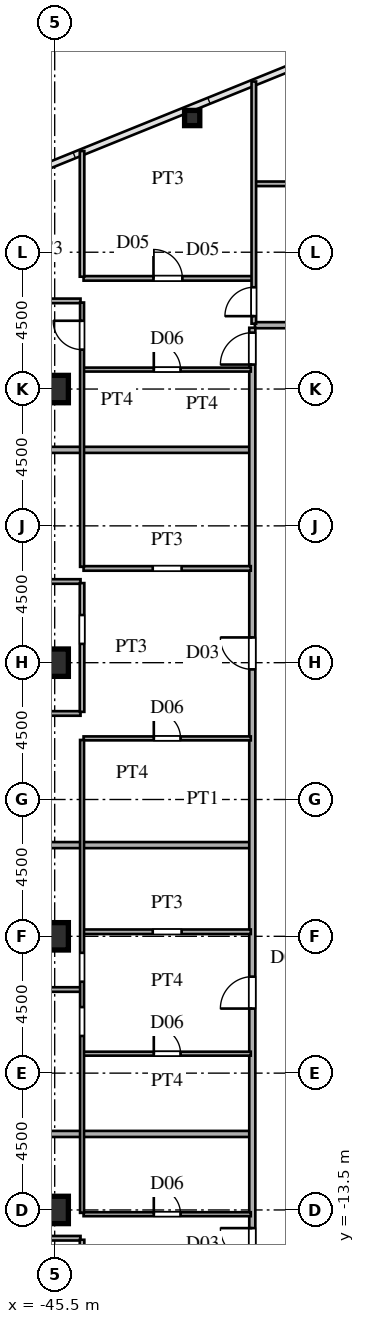
"""IFC4 building model, lengths in metres.
Left out: names, types, materials, properties, quantities, classifications, styles, units other than length and angle.
Written with IfcOpenShell. Run it as: python <this file> out.ifc"""

import sys

from ifc_helpers import new_model, si_unit, direction, frame, frame_2d, origin, origin_2d, place, context, subcontext, project, spatial, rectangle, hollow_rectangle, i_section, extrude, source, transform, mapped, element, fill, save


model = new_model("IFC4")
c1 = context("Model", 3, precision=1e-05, world=origin(), true_north=direction((0.0, 1.0)))
c2 = subcontext(c1, "Body", "Model", "MODEL_VIEW")
j1 = project(units=[si_unit("LENGTHUNIT", "METRE"), si_unit("PLANEANGLEUNIT", "RADIAN")], contexts=[c1])
p1 = place(None, origin())
s1 = spatial("IfcSite", under=j1, at=p1, CompositionType="ELEMENT")
p2 = place(p1, origin())
s2 = spatial("IfcBuilding", under=s1, at=p2, CompositionType="ELEMENT")
p3 = place(p2, frame((0.0, 0.0, 36.9)))
s3 = spatial("IfcBuildingStorey", under=s2, at=p3, CompositionType="ELEMENT", Elevation=36.9)
m1 = source(origin(), c2, "Body", "SweptSolid", [
    extrude(i_section(OverallWidth=0.9, OverallDepth=0.9, WebThickness=0.036, FlangeThickness=0.055, at=origin_2d()), origin(), (0.0, 0.0, 1.0), 3.6),
])
for number, where, z_axis, x_axis in (
    (1, (-45.5, -13.5, 0.0), (0.0, 0.0, 1.0), (1.0, 0.0, 0.0)),
    (2, (-45.5, -4.5, 0.0), (0.0, 0.0, 1.0), (1.0, 0.0, 0.0)),
    (3, (-45.5, 4.5, 0.0), (0.0, 0.0, 1.0), (1.0, 0.0, 0.0)),
    (4, (-45.5, 13.5, 0.0), (0.0, 0.0, 1.0), (1.0, 0.0, 0.0)),
):
    element("IfcColumn", number, at=place(p3, frame(where, z_axis=z_axis, x_axis=x_axis)), inside=s3, PredefinedType="COLUMN", context=c2, shape_type="MappedRepresentation", body=[
        mapped(m1, transform((0.0, 0.0, 0.0), scale=1.0)),
    ])
m2 = source(origin(), c2, "Body", "SweptSolid", [
    extrude(hollow_rectangle(XDim=0.5, YDim=0.5, WallThickness=0.02, at=origin_2d()), origin(), (0.0, 0.0, 1.0), 3.6),
])
p4 = place(p3, frame((-40.977, 22.414, 0.0), z_axis=(0.0, 0.0, 1.0), x_axis=(1.0, 0.0, 0.0)))
e5 = element("IfcColumn", 5, at=p4, inside=s3, PredefinedType="COLUMN", context=c2, shape_type="MappedRepresentation", body=[
    mapped(m2, transform((0.0, 0.0, 0.0), scale=1.0)),
])
p5 = place(p3, frame((-61.588, -14.43, 0.0), z_axis=(0.0, 0.0, 1.0), x_axis=(1.0, 0.0, 0.0)))
e6 = element("IfcWall", 6, at=p5, inside=s3, PredefinedType="PARTITIONING", context=c2, shape_type="SweptSolid", body=[
    extrude(rectangle(XDim=16.938, YDim=0.15, at=frame_2d((8.469, 0.0))), origin(), (0.0, 0.0, 1.0), 3.38),
])
p6 = place(p5, frame((11.563, 0.0, 0.0)))
e7 = element("IfcOpeningElement", 7, at=p6, cuts=e6, PredefinedType="OPENING", context=c2, shape_type="SweptSolid", body=[
    extrude(rectangle(XDim=0.95, YDim=2.15, at=frame_2d((0.475, 1.075))), frame((0.0, 0.085, 0.0), z_axis=(0.0, -1.0, 0.0), x_axis=(1.0, 0.0, 0.0)), (0.0, 0.0, 1.0), 0.17),
])
p7 = place(p3, frame((-44.55, -13.64, 0.0), z_axis=(0.0, 0.0, 1.0), x_axis=(1.0, 0.0, 0.0)))
e8 = element("IfcWall", 8, at=p7, inside=s3, PredefinedType="PARTITIONING", context=c2, shape_type="SweptSolid", body=[
    extrude(rectangle(XDim=5.5, YDim=0.13, at=frame_2d((2.75, 0.0))), origin(), (0.0, 0.0, 1.0), 2.68),
])
p8 = place(p7, frame((2.31, 0.0, 0.0)))
e9 = element("IfcOpeningElement", 9, at=p8, cuts=e8, PredefinedType="OPENING", context=c2, shape_type="SweptSolid", body=[
    extrude(rectangle(XDim=0.88, YDim=2.1, at=frame_2d((0.44, 1.05))), frame((0.0, 0.075, 0.0), z_axis=(0.0, -1.0, 0.0), x_axis=(1.0, 0.0, 0.0)), (0.0, 0.0, 1.0), 0.15),
])
p9 = place(p3, frame((-70.043, -11.0, 0.0), z_axis=(0.0, 0.0, 1.0), x_axis=(1.0, 0.0, 0.0)))
e10 = element("IfcWall", 10, at=p9, inside=s3, PredefinedType="PARTITIONING", context=c2, shape_type="SweptSolid", body=[
    extrude(rectangle(XDim=30.963, YDim=0.2, at=frame_2d((15.481, 0.0))), origin(), (0.0, 0.0, 1.0), 3.38),
])
p10 = place(p3, frame((-44.55, -8.36, 0.0), z_axis=(0.0, 0.0, 1.0), x_axis=(1.0, 0.0, 0.0)))
e11 = element("IfcWall", 11, at=p10, inside=s3, PredefinedType="PARTITIONING", context=c2, shape_type="SweptSolid", body=[
    extrude(rectangle(XDim=5.5, YDim=0.13, at=frame_2d((2.75, 0.0))), origin(), (0.0, 0.0, 1.0), 3.38),
])
p11 = place(p10, frame((2.31, 0.0, 0.0)))
e12 = element("IfcOpeningElement", 12, at=p11, cuts=e11, PredefinedType="OPENING", context=c2, shape_type="SweptSolid", body=[
    extrude(rectangle(XDim=0.88, YDim=2.1, at=frame_2d((0.44, 1.05))), frame((0.0, 0.075, 0.0), z_axis=(0.0, -1.0, 0.0), x_axis=(1.0, 0.0, 0.0)), (0.0, 0.0, 1.0), 0.15),
])
p12 = place(p3, frame((-72.535, -6.25, 0.0), z_axis=(0.0, 0.0, 1.0), x_axis=(1.0, 0.0, 0.0)))
e13 = element("IfcWall", 13, at=p12, inside=s3, PredefinedType="PARTITIONING", context=c2, shape_type="SweptSolid", body=[
    extrude(rectangle(XDim=27.885, YDim=0.15, at=frame_2d((13.942, 0.0))), origin(), (0.0, 0.0, 1.0), 3.38),
])
p13 = place(p12, frame((14.71, 0.0, 0.0)))
e14 = element("IfcOpeningElement", 14, at=p13, cuts=e13, PredefinedType="OPENING", context=c2, shape_type="SweptSolid", body=[
    extrude(rectangle(XDim=0.95, YDim=2.15, at=frame_2d((0.475, 1.075))), frame((0.0, 0.085, 0.0), z_axis=(0.0, -1.0, 0.0), x_axis=(1.0, 0.0, 0.0)), (0.0, 0.0, 1.0), 0.17),
])
p14 = place(p3, frame((-44.55, -4.35, 0.0), z_axis=(0.0, 0.0, 1.0), x_axis=(1.0, 0.0, 0.0)))
e15 = element("IfcWall", 15, at=p14, inside=s3, PredefinedType="PARTITIONING", context=c2, shape_type="SweptSolid", body=[
    extrude(rectangle(XDim=5.5, YDim=0.15, at=frame_2d((2.75, 0.0))), origin(), (0.0, 0.0, 1.0), 2.68),
])
p15 = place(p14, frame((2.275, 0.0, 0.0)))
e16 = element("IfcOpeningElement", 16, at=p15, cuts=e15, PredefinedType="OPENING", context=c2, shape_type="SweptSolid", body=[
    extrude(rectangle(XDim=0.95, YDim=2.15, at=frame_2d((0.475, 1.075))), frame((0.0, 0.085, 0.0), z_axis=(0.0, -1.0, 0.0), x_axis=(1.0, 0.0, 0.0)), (0.0, 0.0, 1.0), 0.17),
])
p16 = place(p3, frame((-72.505, -1.5, 0.0), z_axis=(0.0, 0.0, 1.0), x_axis=(1.0, 0.0, 0.0)))
e17 = element("IfcWall", 17, at=p16, inside=s3, PredefinedType="PARTITIONING", context=c2, shape_type="SweptSolid", body=[
    extrude(rectangle(XDim=33.425, YDim=0.2, at=frame_2d((16.712, 0.0))), origin(), (0.0, 0.0, 1.0), 3.38),
])
p17 = place(p3, frame((-44.55, 2.01, 0.0), z_axis=(0.0, 0.0, 1.0), x_axis=(1.0, 0.0, 0.0)))
e18 = element("IfcWall", 18, at=p17, inside=s3, PredefinedType="PARTITIONING", context=c2, shape_type="SweptSolid", body=[
    extrude(rectangle(XDim=5.5, YDim=0.13, at=frame_2d((2.75, 0.0))), origin(), (0.0, 0.0, 1.0), 3.38),
])
p18 = place(p17, frame((2.31, 0.0, 0.0)))
e19 = element("IfcOpeningElement", 19, at=p18, cuts=e18, PredefinedType="OPENING", context=c2, shape_type="SweptSolid", body=[
    extrude(rectangle(XDim=0.88, YDim=2.1, at=frame_2d((0.44, 1.05))), frame((0.0, 0.075, 0.0), z_axis=(0.0, -1.0, 0.0), x_axis=(1.0, 0.0, 0.0)), (0.0, 0.0, 1.0), 0.15),
])
p19 = place(p3, frame((-72.535, 2.83, 0.0), z_axis=(0.0, 0.0, 1.0), x_axis=(1.0, 0.0, 0.0)))
e20 = element("IfcWall", 20, at=p19, inside=s3, PredefinedType="PARTITIONING", context=c2, shape_type="SweptSolid", body=[
    extrude(rectangle(XDim=27.885, YDim=0.15, at=frame_2d((13.942, 0.0))), origin(), (0.0, 0.0, 1.0), 3.38),
])
p20 = place(p19, frame((22.51, 0.0, 0.0)))
e21 = element("IfcOpeningElement", 21, at=p20, cuts=e20, PredefinedType="OPENING", context=c2, shape_type="SweptSolid", body=[
    extrude(rectangle(XDim=0.95, YDim=2.15, at=frame_2d((0.475, 1.075))), frame((0.0, 0.085, 0.0), z_axis=(0.0, -1.0, 0.0), x_axis=(1.0, 0.0, 0.0)), (0.0, 0.0, 1.0), 0.17),
])
p21 = place(p19, frame((14.71, 0.0, 0.0)))
e22 = element("IfcOpeningElement", 22, at=p21, cuts=e20, PredefinedType="OPENING", context=c2, shape_type="SweptSolid", body=[
    extrude(rectangle(XDim=0.95, YDim=2.15, at=frame_2d((0.475, 1.075))), frame((0.0, 0.085, 0.0), z_axis=(0.0, -1.0, 0.0), x_axis=(1.0, 0.0, 0.0)), (0.0, 0.0, 1.0), 0.17),
])
p22 = place(p3, frame((-72.535, 7.17, 0.0), z_axis=(0.0, 0.0, 1.0), x_axis=(1.0, 0.0, 0.0)))
e23 = element("IfcWall", 23, at=p22, inside=s3, PredefinedType="PARTITIONING", context=c2, shape_type="SweptSolid", body=[
    extrude(rectangle(XDim=27.885, YDim=0.15, at=frame_2d((13.942, 0.0))), origin(), (0.0, 0.0, 1.0), 3.38),
])
p23 = place(p22, frame((22.51, 0.0, 0.0)))
e24 = element("IfcOpeningElement", 24, at=p23, cuts=e23, PredefinedType="OPENING", context=c2, shape_type="SweptSolid", body=[
    extrude(rectangle(XDim=0.95, YDim=2.15, at=frame_2d((0.475, 1.075))), frame((0.0, 0.085, 0.0), z_axis=(0.0, -1.0, 0.0), x_axis=(1.0, 0.0, 0.0)), (0.0, 0.0, 1.0), 0.17),
])
p24 = place(p22, frame((14.71, 0.0, 0.0)))
e25 = element("IfcOpeningElement", 25, at=p24, cuts=e23, PredefinedType="OPENING", context=c2, shape_type="SweptSolid", body=[
    extrude(rectangle(XDim=0.95, YDim=2.15, at=frame_2d((0.475, 1.075))), frame((0.0, 0.085, 0.0), z_axis=(0.0, -1.0, 0.0), x_axis=(1.0, 0.0, 0.0)), (0.0, 0.0, 1.0), 0.17),
])
p25 = place(p3, frame((-44.55, 7.6, 0.0), z_axis=(0.0, 0.0, 1.0), x_axis=(1.0, 0.0, 0.0)))
e26 = element("IfcWall", 26, at=p25, inside=s3, PredefinedType="PARTITIONING", context=c2, shape_type="SweptSolid", body=[
    extrude(rectangle(XDim=5.5, YDim=0.15, at=frame_2d((2.75, 0.0))), origin(), (0.0, 0.0, 1.0), 3.38),
])
p26 = place(p25, frame((2.275, 0.0, 0.0)))
e27 = element("IfcOpeningElement", 27, at=p26, cuts=e26, PredefinedType="OPENING", context=c2, shape_type="SweptSolid", body=[
    extrude(rectangle(XDim=0.95, YDim=2.15, at=frame_2d((0.475, 1.075))), frame((0.0, 0.085, 0.0), z_axis=(0.0, -1.0, 0.0), x_axis=(1.0, 0.0, 0.0)), (0.0, 0.0, 1.0), 0.17),
])
p27 = place(p3, frame((-68.807, 11.5, 0.0), z_axis=(0.0, 0.0, 1.0), x_axis=(1.0, 0.0, 0.0)))
e28 = element("IfcWall", 28, at=p27, inside=s3, PredefinedType="PARTITIONING", context=c2, shape_type="SweptSolid", body=[
    extrude(rectangle(XDim=29.727, YDim=0.2, at=frame_2d((14.863, 0.0))), origin(), (0.0, 0.0, 1.0), 3.38),
])
p28 = place(p3, frame((-44.55, 14.14, 0.0), z_axis=(0.0, 0.0, 1.0), x_axis=(1.0, 0.0, 0.0)))
e29 = element("IfcWall", 29, at=p28, inside=s3, PredefinedType="PARTITIONING", context=c2, shape_type="SweptSolid", body=[
    extrude(rectangle(XDim=5.5, YDim=0.13, at=frame_2d((2.75, 0.0))), origin(), (0.0, 0.0, 1.0), 3.38),
])
p29 = place(p28, frame((2.31, 0.0, 0.0)))
e30 = element("IfcOpeningElement", 30, at=p29, cuts=e29, PredefinedType="OPENING", context=c2, shape_type="SweptSolid", body=[
    extrude(rectangle(XDim=0.88, YDim=2.1, at=frame_2d((0.44, 1.05))), frame((0.0, 0.075, 0.0), z_axis=(0.0, -1.0, 0.0), x_axis=(1.0, 0.0, 0.0)), (0.0, 0.0, 1.0), 0.15),
])
p30 = place(p3, frame((-38.915, 15.6, 0.0), z_axis=(0.0, 0.0, 1.0), x_axis=(1.0, 0.0, 0.0)))
e31 = element("IfcWall", 31, at=p30, inside=s3, PredefinedType="PARTITIONING", context=c2, shape_type="SweptSolid", body=[
    extrude(rectangle(XDim=2.33, YDim=0.2, at=frame_2d((1.165, 0.0))), origin(), (0.0, 0.0, 1.0), 3.38),
])
p31 = place(p3, frame((-54.45, 16.4, 0.0), z_axis=(0.0, 0.0, 1.0), x_axis=(1.0, 0.0, 0.0)))
e32 = element("IfcWall", 32, at=p31, inside=s3, PredefinedType="PARTITIONING", context=c2, shape_type="SweptSolid", body=[
    extrude(rectangle(XDim=9.8, YDim=0.15, at=frame_2d((4.9, 0.0))), origin(), (0.0, 0.0, 1.0), 3.38),
])
p32 = place(p31, frame((4.425, 0.0, 0.0)))
e33 = element("IfcOpeningElement", 33, at=p32, cuts=e32, PredefinedType="OPENING", context=c2, shape_type="SweptSolid", body=[
    extrude(rectangle(XDim=0.95, YDim=2.15, at=frame_2d((0.475, 1.075))), frame((0.0, 0.085, 0.0), z_axis=(0.0, -1.0, 0.0), x_axis=(1.0, 0.0, 0.0)), (0.0, 0.0, 1.0), 0.17),
])
p33 = place(p3, frame((-44.55, 17.14, 0.0), z_axis=(0.0, 0.0, 1.0), x_axis=(1.0, 0.0, 0.0)))
e34 = element("IfcWall", 34, at=p33, inside=s3, PredefinedType="PARTITIONING", context=c2, shape_type="SweptSolid", body=[
    extrude(rectangle(XDim=5.55, YDim=0.15, at=frame_2d((2.775, 0.0))), origin(), (0.0, 0.0, 1.0), 3.38),
])
p34 = place(p33, frame((2.3, 0.0, 0.0)))
e35 = element("IfcOpeningElement", 35, at=p34, cuts=e34, PredefinedType="OPENING", context=c2, shape_type="SweptSolid", body=[
    extrude(rectangle(XDim=0.95, YDim=2.15, at=frame_2d((0.475, 1.075))), frame((0.0, 0.085, 0.0), z_axis=(0.0, -1.0, 0.0), x_axis=(1.0, 0.0, 0.0)), (0.0, 0.0, 1.0), 0.17),
])
p35 = place(p3, frame((-38.9, 20.25, 0.0), z_axis=(0.0, 0.0, 1.0), x_axis=(1.0, 0.0, 0.0)))
e36 = element("IfcWall", 36, at=p35, inside=s3, PredefinedType="PARTITIONING", context=c2, shape_type="SweptSolid", body=[
    extrude(rectangle(XDim=11.435, YDim=0.15, at=frame_2d((5.717, 0.0))), origin(), (0.0, 0.0, 1.0), 3.38),
])
p36 = place(p35, frame((5.2, 0.0, 0.0)))
e37 = element("IfcOpeningElement", 37, at=p36, cuts=e36, PredefinedType="OPENING", context=c2, shape_type="SweptSolid", body=[
    extrude(rectangle(XDim=0.95, YDim=2.15, at=frame_2d((0.475, 1.075))), frame((0.0, 0.085, 0.0), z_axis=(0.0, -1.0, 0.0), x_axis=(1.0, 0.0, 0.0)), (0.0, 0.0, 1.0), 0.17),
])
p37 = place(p3, frame((-44.6, -21.328, 0.0), z_axis=(0.0, 0.0, 1.0), x_axis=(0.0, 1.0, 0.0)))
e38 = element("IfcWall", 38, at=p37, inside=s3, PredefinedType="PARTITIONING", context=c2, shape_type="SweptSolid", body=[
    extrude(rectangle(XDim=6.847, YDim=0.15, at=frame_2d((3.423, 0.0))), origin(), (0.0, 0.0, 1.0), 3.38),
])
p38 = place(p37, frame((5.315, 0.0, 0.0)))
e39 = element("IfcOpeningElement", 39, at=p38, cuts=e38, PredefinedType="OPENING", context=c2, shape_type="SweptSolid", body=[
    extrude(rectangle(XDim=0.95, YDim=2.15, at=frame_2d((0.475, 1.075))), frame((0.0, 0.085, 0.0), z_axis=(0.0, -1.0, 0.0), x_axis=(1.0, 0.0, 0.0)), (0.0, 0.0, 1.0), 0.17),
])
p39 = place(p3, frame((-44.6, -13.595, 0.0), z_axis=(0.0, 0.0, 1.0), x_axis=(0.0, 1.0, 0.0)))
e40 = element("IfcWall", 40, at=p39, inside=s3, PredefinedType="PARTITIONING", context=c2, shape_type="SweptSolid", body=[
    extrude(rectangle(XDim=15.553, YDim=0.13, at=frame_2d((7.776, 0.0))), origin(), (0.0, 0.0, 1.0), 3.38),
])
p40 = place(p39, frame((5.817, 0.0, 0.0)))
e41 = element("IfcOpeningElement", 41, at=p40, cuts=e40, PredefinedType="OPENING", context=c2, shape_type="SweptSolid", body=[
    extrude(rectangle(XDim=0.95, YDim=2.15, at=frame_2d((0.475, 1.075))), frame((0.0, 0.075, 0.0), z_axis=(0.0, -1.0, 0.0), x_axis=(1.0, 0.0, 0.0)), (0.0, 0.0, 1.0), 0.15),
])
p41 = place(p39, frame((7.602, 0.0, 0.0)))
e42 = element("IfcOpeningElement", 42, at=p41, cuts=e40, PredefinedType="OPENING", context=c2, shape_type="SweptSolid", body=[
    extrude(rectangle(XDim=0.95, YDim=2.15, at=frame_2d((0.475, 1.075))), frame((0.0, 0.075, 0.0), z_axis=(0.0, -1.0, 0.0), x_axis=(1.0, 0.0, 0.0)), (0.0, 0.0, 1.0), 0.15),
])
p42 = place(p3, frame((-44.6, 2.883, 0.0), z_axis=(0.0, 0.0, 1.0), x_axis=(0.0, 1.0, 0.0)))
e43 = element("IfcWall", 43, at=p42, inside=s3, PredefinedType="PARTITIONING", context=c2, shape_type="SweptSolid", body=[
    extrude(rectangle(XDim=4.234, YDim=0.15, at=frame_2d((2.117, 0.0))), origin(), (0.0, 0.0, 1.0), 3.38),
])
p43 = place(p42, frame((2.235, 0.0, 0.0)))
e44 = element("IfcOpeningElement", 44, at=p43, cuts=e43, PredefinedType="OPENING", context=c2, shape_type="SweptSolid", body=[
    extrude(rectangle(XDim=0.95, YDim=2.15, at=frame_2d((0.475, 1.075))), frame((0.0, 0.085, 0.0), z_axis=(0.0, -1.0, 0.0), x_axis=(1.0, 0.0, 0.0)), (0.0, 0.0, 1.0), 0.17),
])
p44 = place(p3, frame((-44.6, 7.652, 0.0), z_axis=(0.0, 0.0, 1.0), x_axis=(0.0, 1.0, 0.0)))
e45 = element("IfcWall", 45, at=p44, inside=s3, PredefinedType="PARTITIONING", context=c2, shape_type="SweptSolid", body=[
    extrude(rectangle(XDim=8.694, YDim=0.13, at=frame_2d((4.347, 0.0))), origin(), (0.0, 0.0, 1.0), 3.38),
])
p45 = place(p44, frame((7.144, 0.0, 0.0)))
e46 = element("IfcOpeningElement", 46, at=p45, cuts=e45, PredefinedType="OPENING", context=c2, shape_type="SweptSolid", body=[
    extrude(rectangle(XDim=0.95, YDim=2.15, at=frame_2d((0.475, 1.075))), frame((0.0, 0.075, 0.0), z_axis=(0.0, -1.0, 0.0), x_axis=(1.0, 0.0, 0.0)), (0.0, 0.0, 1.0), 0.15),
])
p46 = place(p3, frame((-44.6, 17.195, 0.0), z_axis=(0.0, 0.0, 1.0), x_axis=(0.0, 1.0, 0.0)))
e47 = element("IfcWall", 47, at=p46, inside=s3, PredefinedType="PARTITIONING", context=c2, shape_type="SweptSolid", body=[
    extrude(rectangle(XDim=4.133, YDim=0.15, at=frame_2d((2.066, 0.0))), origin(), (0.0, 0.0, 1.0), 3.38),
])
p47 = place(p3, frame((-39.0, -15.515, 0.0), z_axis=(0.0, 0.0, 1.0), x_axis=(0.0, 1.0, 0.0)))
e48 = element("IfcWall", 48, at=p47, inside=s3, PredefinedType="PARTITIONING", context=c2, shape_type="SweptSolid", body=[
    extrude(rectangle(XDim=31.03, YDim=0.2, at=frame_2d((15.515, 0.0))), origin(), (0.0, 0.0, 1.0), 3.38),
])
p48 = place(p47, frame((0.367, 0.0, 0.0)))
e49 = element("IfcOpeningElement", 49, at=p48, cuts=e48, PredefinedType="OPENING", context=c2, shape_type="SweptSolid", body=[
    extrude(rectangle(XDim=1.05, YDim=2.25, at=frame_2d((0.525, 1.125))), frame((0.0, 0.11, 0.0), z_axis=(0.0, -1.0, 0.0), x_axis=(1.0, 0.0, 0.0)), (0.0, 0.0, 1.0), 0.22),
])
p49 = place(p47, frame((8.638, 0.0, 0.0)))
e50 = element("IfcOpeningElement", 50, at=p49, cuts=e48, PredefinedType="OPENING", context=c2, shape_type="SweptSolid", body=[
    extrude(rectangle(XDim=1.05, YDim=2.25, at=frame_2d((0.525, 1.125))), frame((0.0, 0.11, 0.0), z_axis=(0.0, -1.0, 0.0), x_axis=(1.0, 0.0, 0.0)), (0.0, 0.0, 1.0), 0.22),
])
p50 = place(p47, frame((19.795, 0.0, 0.0)))
e51 = element("IfcOpeningElement", 51, at=p50, cuts=e48, PredefinedType="OPENING", context=c2, shape_type="SweptSolid", body=[
    extrude(rectangle(XDim=1.05, YDim=2.25, at=frame_2d((0.525, 1.125))), frame((0.0, 0.11, 0.0), z_axis=(0.0, -1.0, 0.0), x_axis=(1.0, 0.0, 0.0)), (0.0, 0.0, 1.0), 0.22),
])
p51 = place(p47, frame((29.82, 0.0, 0.0)))
e52 = element("IfcOpeningElement", 52, at=p51, cuts=e48, PredefinedType="OPENING", context=c2, shape_type="SweptSolid", body=[
    extrude(rectangle(XDim=1.05, YDim=2.25, at=frame_2d((0.525, 1.125))), frame((0.0, 0.11, 0.0), z_axis=(0.0, -1.0, 0.0), x_axis=(1.0, 0.0, 0.0)), (0.0, 0.0, 1.0), 0.22),
])
p52 = place(p3, frame((-38.95, 15.65, 0.0), z_axis=(0.0, 0.0, 1.0), x_axis=(0.0, 1.0, 0.0)))
e53 = element("IfcWall", 53, at=p52, inside=s3, PredefinedType="PARTITIONING", context=c2, shape_type="SweptSolid", body=[
    extrude(rectangle(XDim=7.965, YDim=0.15, at=frame_2d((3.982, 0.0))), origin(), (0.0, 0.0, 1.0), 3.38),
])
p53 = place(p52, frame((0.248, 0.0, 0.0)))
e54 = element("IfcOpeningElement", 54, at=p53, cuts=e53, PredefinedType="OPENING", context=c2, shape_type="SweptSolid", body=[
    extrude(rectangle(XDim=0.95, YDim=2.15, at=frame_2d((0.475, 1.075))), frame((0.0, 0.085, 0.0), z_axis=(0.0, -1.0, 0.0), x_axis=(1.0, 0.0, 0.0)), (0.0, 0.0, 1.0), 0.17),
])
m3 = source(origin(), c2, "Body", "SweptSolid", [
    extrude(rectangle(XDim=0.88, YDim=2.1, at=frame_2d((0.44, 1.05))), frame((0.0, 0.025, 0.0), z_axis=(0.0, -1.0, 0.0), x_axis=(1.0, 0.0, 0.0)), (0.0, 0.0, 1.0), 0.05),
])
p54 = place(p8, origin())
e55 = element("IfcDoor", 55, at=p54, inside=s3, OperationType="SINGLE_SWING_LEFT", PredefinedType="DOOR", context=c2, shape_type="MappedRepresentation", body=[
    mapped(m3, transform((0.0, 0.0, 0.0), scale=1.0)),
])
fill(e9, e55)
p55 = place(p11, origin())
e56 = element("IfcDoor", 56, at=p55, inside=s3, OperationType="SINGLE_SWING_LEFT", PredefinedType="DOOR", context=c2, shape_type="MappedRepresentation", body=[
    mapped(m3, transform((0.0, 0.0, 0.0), scale=1.0)),
])
fill(e12, e56)
p56 = place(p18, origin())
e57 = element("IfcDoor", 57, at=p56, inside=s3, OperationType="SINGLE_SWING_LEFT", PredefinedType="DOOR", context=c2, shape_type="MappedRepresentation", body=[
    mapped(m3, transform((0.0, 0.0, 0.0), scale=1.0)),
])
fill(e19, e57)
p57 = place(p29, origin())
e58 = element("IfcDoor", 58, at=p57, inside=s3, OperationType="SINGLE_SWING_LEFT", PredefinedType="DOOR", context=c2, shape_type="MappedRepresentation", body=[
    mapped(m3, transform((0.0, 0.0, 0.0), scale=1.0)),
])
fill(e30, e58)
m4 = source(origin(), c2, "Body", "SweptSolid", [
    extrude(rectangle(XDim=0.95, YDim=2.15, at=frame_2d((0.475, 1.075))), frame((0.0, 0.025, 0.0), z_axis=(0.0, -1.0, 0.0), x_axis=(1.0, 0.0, 0.0)), (0.0, 0.0, 1.0), 0.05),
])
p58 = place(p34, origin())
e59 = element("IfcDoor", 59, at=p58, inside=s3, OperationType="SINGLE_SWING_LEFT", PredefinedType="DOOR", context=c2, shape_type="MappedRepresentation", body=[
    mapped(m4, transform((0.0, 0.0, 0.0), scale=1.0)),
])
fill(e35, e59)
p59 = place(p45, origin())
e60 = element("IfcDoor", 60, at=p59, inside=s3, OperationType="SINGLE_SWING_RIGHT", PredefinedType="DOOR", context=c2, shape_type="MappedRepresentation", body=[
    mapped(m4, transform((0.0, 0.0, 0.0), scale=1.0)),
])
fill(e46, e60)
m5 = source(origin(), c2, "Body", "SweptSolid", [
    extrude(rectangle(XDim=1.05, YDim=2.25, at=frame_2d((0.525, 1.125))), frame((0.0, 0.025, 0.0), z_axis=(0.0, -1.0, 0.0), x_axis=(1.0, 0.0, 0.0)), (0.0, 0.0, 1.0), 0.05),
])
p60 = place(p48, origin())
e61 = element("IfcDoor", 61, at=p60, inside=s3, OperationType="SINGLE_SWING_RIGHT", PredefinedType="DOOR", context=c2, shape_type="MappedRepresentation", body=[
    mapped(m5, transform((0.0, 0.0, 0.0), scale=1.0)),
])
fill(e49, e61)
p61 = place(p49, origin())
e62 = element("IfcDoor", 62, at=p61, inside=s3, OperationType="SINGLE_SWING_LEFT", PredefinedType="DOOR", context=c2, shape_type="MappedRepresentation", body=[
    mapped(m5, transform((0.0, 0.0, 0.0), scale=1.0)),
])
fill(e50, e62)
p62 = place(p50, origin())
e63 = element("IfcDoor", 63, at=p62, inside=s3, OperationType="SINGLE_SWING_RIGHT", PredefinedType="DOOR", context=c2, shape_type="MappedRepresentation", body=[
    mapped(m5, transform((0.0, 0.0, 0.0), scale=1.0)),
])
fill(e51, e63)
p63 = place(p51, origin())
e64 = element("IfcDoor", 64, at=p63, inside=s3, OperationType="SINGLE_SWING_LEFT", PredefinedType="DOOR", context=c2, shape_type="MappedRepresentation", body=[
    mapped(m5, transform((0.0, 0.0, 0.0), scale=1.0)),
])
fill(e52, e64)
p64 = place(p53, origin())
e65 = element("IfcDoor", 65, at=p64, inside=s3, OperationType="SINGLE_SWING_LEFT", PredefinedType="DOOR", context=c2, shape_type="MappedRepresentation", body=[
    mapped(m4, transform((0.0, 0.0, 0.0), scale=1.0)),
])
fill(e54, e65)
save(model, sys.argv[1])
